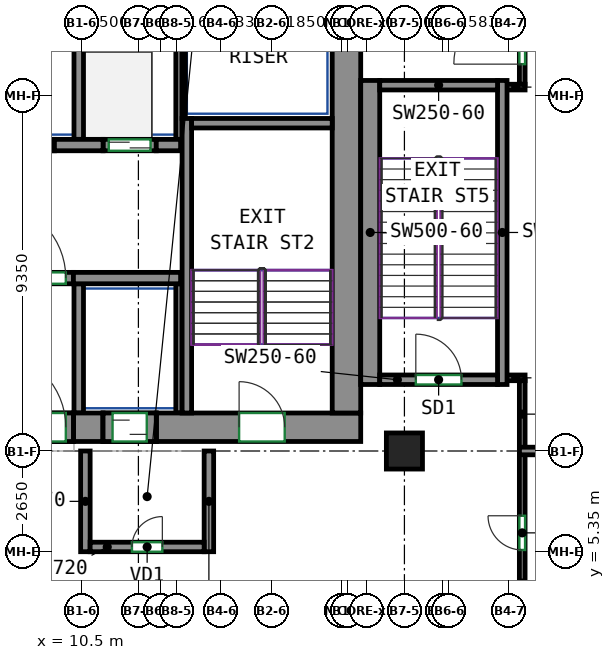
"""IFC4 building model, lengths in metres.
Left out: names, types, materials, properties, quantities, classifications, styles, units other than length and angle.
Written with IfcOpenShell. Run it as: python <this file> out.ifc"""

import sys

from ifc_helpers import new_model, si_unit, direction, frame, frame_2d, origin, origin_2d, place, context, subcontext, project, spatial, rectangle, extrude, source, transform, mapped, element, fill, save


model = new_model("IFC4")
c1 = context("Model", 3, precision=1e-05, world=origin(), true_north=direction((0.0, 1.0)))
c2 = subcontext(c1, "Body", "Model", "MODEL_VIEW")
j1 = project(units=[si_unit("LENGTHUNIT", "METRE"), si_unit("PLANEANGLEUNIT", "RADIAN")], contexts=[c1])
p1 = place(None, origin())
s1 = spatial("IfcSite", under=j1, at=p1, CompositionType="ELEMENT")
p2 = place(p1, origin())
s2 = spatial("IfcBuilding", under=s1, at=p2, CompositionType="ELEMENT")
p3 = place(p2, frame((0.0, 0.0, 233.6)))
s3 = spatial("IfcBuildingStorey", under=s2, at=p3, CompositionType="ELEMENT", Elevation=233.6)
m1 = source(origin(), c2, "Body", "SweptSolid", [
    extrude(rectangle(XDim=0.95, YDim=0.95, at=origin_2d()), origin(), (0.0, 0.0, 1.0), 5.12),
])
p4 = place(p3, frame((19.0, 8.0, 0.0), z_axis=(0.0, 0.0, 1.0), x_axis=(1.0, 0.0, 0.0)))
e1 = element("IfcColumn", 1, at=p4, inside=s3, PredefinedType="COLUMN", context=c2, shape_type="MappedRepresentation", body=[
    mapped(m1, transform((0.0, 0.0, 0.0))),
])
m2 = source(origin(), c2, "Body", "SweptSolid", [
    extrude(rectangle(XDim=0.78, YDim=0.75, at=frame_2d((0.39, 0.0))), origin(), (0.0, 0.0, 1.0), 5.12),
])
p5 = place(p3, frame((10.29, 8.625, 0.0), z_axis=(0.0, 0.0, 1.0), x_axis=(1.0, 0.0, 0.0)))
e2 = element("IfcWall", 2, at=p5, inside=s3, PredefinedType="SHEAR", context=c2, shape_type="MappedRepresentation", body=[
    mapped(m2, transform((0.0, 0.0, 0.0))),
])
m3 = source(origin(), c2, "Body", "SweptSolid", [
    extrude(rectangle(XDim=5.38, YDim=0.75, at=frame_2d((2.69, 0.0))), origin(), (0.0, 0.0, 1.0), 5.12),
])
p6 = place(p3, frame((12.47, 8.625, 0.0), z_axis=(0.0, 0.0, 1.0), x_axis=(1.0, 0.0, 0.0)))
e3 = element("IfcWall", 3, at=p6, inside=s3, PredefinedType="SHEAR", context=c2, shape_type="MappedRepresentation", body=[
    mapped(m3, transform((0.0, 0.0, 0.0))),
])
p7 = place(p6, frame((2.18, 0.0, 0.0)))
e4 = element("IfcOpeningElement", 4, at=p7, cuts=e3, PredefinedType="OPENING", context=c2, shape_type="SweptSolid", body=[
    extrude(rectangle(XDim=1.2, YDim=2.1, at=frame_2d((0.6, 1.05))), frame((0.0, 0.385, 0.0), z_axis=(0.0, -1.0, 0.0), x_axis=(1.0, 0.0, 0.0)), (0.0, 0.0, 1.0), 0.77),
])
m4 = source(origin(), c2, "Body", "SweptSolid", [
    extrude(rectangle(XDim=12.0, YDim=0.75, at=frame_2d((6.0, 0.0))), origin(), (0.0, 0.0, 1.0), 5.12),
])
p8 = place(p3, frame((17.475, 9.0, 0.0), z_axis=(0.0, 0.0, 1.0), x_axis=(0.0, 1.0, 0.0)))
e5 = element("IfcWall", 5, at=p8, inside=s3, PredefinedType="SHEAR", context=c2, shape_type="MappedRepresentation", body=[
    mapped(m4, transform((0.0, 0.0, 0.0))),
])
m5 = source(origin(), c2, "Body", "SweptSolid", [
    extrude(rectangle(XDim=7.75, YDim=0.25, at=frame_2d((3.875, 0.0))), origin(), (0.0, 0.0, 1.0), 5.12),
])
p9 = place(p3, frame((13.275, 9.0, 0.0), z_axis=(0.0, 0.0, 1.0), x_axis=(0.0, 1.0, 0.0)))
e6 = element("IfcWall", 6, at=p9, inside=s3, PredefinedType="SHEAR", context=c2, shape_type="MappedRepresentation", body=[
    mapped(m5, transform((0.0, 0.0, 0.0))),
])
m6 = source(origin(), c2, "Body", "SweptSolid", [
    extrude(rectangle(XDim=3.7, YDim=0.25, at=frame_2d((1.85, 0.0))), origin(), (0.0, 0.0, 1.0), 5.12),
])
p10 = place(p3, frame((13.4, 16.625, 0.0), z_axis=(0.0, 0.0, 1.0), x_axis=(1.0, 0.0, 0.0)))
e7 = element("IfcWall", 7, at=p10, inside=s3, PredefinedType="SHEAR", context=c2, shape_type="MappedRepresentation", body=[
    mapped(m6, transform((0.0, 0.0, 0.0))),
])
m7 = source(origin(), c2, "Body", "SweptSolid", [
    extrude(rectangle(XDim=8.0, YDim=0.5, at=frame_2d((4.0, 0.0))), origin(), (0.0, 0.0, 1.0), 5.12),
])
p11 = place(p3, frame((18.1, 9.75, 0.0), z_axis=(0.0, 0.0, 1.0), x_axis=(0.0, 1.0, 0.0)))
e8 = element("IfcWall", 8, at=p11, inside=s3, PredefinedType="SHEAR", context=c2, shape_type="MappedRepresentation", body=[
    mapped(m7, transform((0.0, 0.0, 0.0))),
])
m8 = source(origin(), c2, "Body", "SweptSolid", [
    extrude(rectangle(XDim=8.0, YDim=0.25, at=frame_2d((4.0, 0.0))), origin(), (0.0, 0.0, 1.0), 5.12),
])
p12 = place(p3, frame((21.575, 9.75, 0.0), z_axis=(0.0, 0.0, 1.0), x_axis=(0.0, 1.0, 0.0)))
e9 = element("IfcWall", 9, at=p12, inside=s3, PredefinedType="SHEAR", context=c2, shape_type="MappedRepresentation", body=[
    mapped(m8, transform((0.0, 0.0, 0.0))),
])
m9 = source(origin(), c2, "Body", "SweptSolid", [
    extrude(rectangle(XDim=3.1, YDim=0.25, at=frame_2d((1.55, 0.0))), origin(), (0.0, 0.0, 1.0), 5.12),
])
p13 = place(p3, frame((18.35, 9.875, 0.0), z_axis=(0.0, 0.0, 1.0), x_axis=(1.0, 0.0, 0.0)))
e10 = element("IfcWall", 10, at=p13, inside=s3, PredefinedType="SHEAR", context=c2, shape_type="MappedRepresentation", body=[
    mapped(m9, transform((0.0, 0.0, 0.0))),
])
p14 = place(p13, frame((0.95, 0.0, 0.0)))
e11 = element("IfcOpeningElement", 11, at=p14, cuts=e10, PredefinedType="OPENING", context=c2, shape_type="SweptSolid", body=[
    extrude(rectangle(XDim=1.2, YDim=2.1, at=frame_2d((0.6, 1.05))), frame((0.0, 0.135, 0.0), z_axis=(0.0, -1.0, 0.0), x_axis=(1.0, 0.0, 0.0)), (0.0, 0.0, 1.0), 0.27),
])
p15 = place(p3, frame((18.35, 17.625, 0.0), z_axis=(0.0, 0.0, 1.0), x_axis=(1.0, 0.0, 0.0)))
e12 = element("IfcWall", 12, at=p15, inside=s3, PredefinedType="SHEAR", context=c2, shape_type="MappedRepresentation", body=[
    mapped(m9, transform((0.0, 0.0, 0.0))),
])
m10 = source(origin(), c2, "Body", "SweptSolid", [
    extrude(rectangle(XDim=2.82, YDim=0.3, at=frame_2d((1.41, 0.0))), origin(), (0.0, 0.0, 1.0), 5.12),
])
p16 = place(p3, frame((10.29, 12.55, 0.0), z_axis=(0.0, 0.0, 1.0), x_axis=(1.0, 0.0, 0.0)))
e13 = element("IfcWall", 13, at=p16, inside=s3, PredefinedType="SHEAR", context=c2, shape_type="MappedRepresentation", body=[
    mapped(m10, transform((0.0, 0.0, 0.0))),
])
m11 = source(origin(), c2, "Body", "SweptSolid", [
    extrude(rectangle(XDim=1.28, YDim=0.3, at=frame_2d((0.64, 0.0))), origin(), (0.0, 0.0, 1.0), 5.12),
])
p17 = place(p3, frame((9.79, 16.05, 0.0), z_axis=(0.0, 0.0, 1.0), x_axis=(1.0, 0.0, 0.0)))
e14 = element("IfcWall", 14, at=p17, inside=s3, PredefinedType="SHEAR", context=c2, shape_type="MappedRepresentation", body=[
    mapped(m11, transform((0.0, 0.0, 0.0))),
])
m12 = source(origin(), c2, "Body", "SweptSolid", [
    extrude(rectangle(XDim=0.64, YDim=0.3, at=frame_2d((0.32, 0.0))), origin(), (0.0, 0.0, 1.0), 5.12),
])
p18 = place(p3, frame((12.47, 16.05, 0.0), z_axis=(0.0, 0.0, 1.0), x_axis=(1.0, 0.0, 0.0)))
e15 = element("IfcWall", 15, at=p18, inside=s3, PredefinedType="SHEAR", context=c2, shape_type="MappedRepresentation", body=[
    mapped(m12, transform((0.0, 0.0, 0.0))),
])
m13 = source(origin(), c2, "Body", "SweptSolid", [
    extrude(rectangle(XDim=2.4, YDim=0.75, at=frame_2d((1.2, 0.0))), origin(), (0.0, 0.0, 1.0), 0.92),
])
p19 = place(p3, frame((7.89, 8.625, 4.2), z_axis=(0.0, 0.0, 1.0), x_axis=(1.0, 0.0, 0.0)))
e16 = element("IfcWall", 16, at=p19, inside=s3, PredefinedType="SHEAR", context=c2, shape_type="MappedRepresentation", body=[
    mapped(m13, transform((0.0, 0.0, 0.0))),
])
m14 = source(origin(), c2, "Body", "SweptSolid", [
    extrude(rectangle(XDim=1.4, YDim=0.75, at=frame_2d((0.7, 0.0))), origin(), (0.0, 0.0, 1.0), 1.17),
])
p20 = place(p3, frame((11.07, 8.625, 3.95), z_axis=(0.0, 0.0, 1.0), x_axis=(1.0, 0.0, 0.0)))
e17 = element("IfcWall", 17, at=p20, inside=s3, PredefinedType="SHEAR", context=c2, shape_type="MappedRepresentation", body=[
    mapped(m14, transform((0.0, 0.0, 0.0))),
])
m15 = source(origin(), c2, "Body", "SweptSolid", [
    extrude(rectangle(XDim=1.4, YDim=0.3, at=frame_2d((0.7, 0.0))), origin(), (0.0, 0.0, 1.0), 5.12),
])
p21 = place(p3, frame((11.07, 16.05, 0.0), z_axis=(0.0, 0.0, 1.0), x_axis=(1.0, 0.0, 0.0)))
e18 = element("IfcWall", 18, at=p21, inside=s3, PredefinedType="PARTITIONING", context=c2, shape_type="MappedRepresentation", body=[
    mapped(m15, transform((0.0, 0.0, 0.0))),
])
p22 = place(p21, frame((0.15, 0.0, 0.0)))
e19 = element("IfcOpeningElement", 19, at=p22, cuts=e18, PredefinedType="OPENING", context=c2, shape_type="SweptSolid", body=[
    extrude(rectangle(XDim=1.1, YDim=2.1, at=frame_2d((0.55, 1.05))), frame((0.0, 0.16, 0.0), z_axis=(0.0, -1.0, 0.0), x_axis=(1.0, 0.0, 0.0)), (0.0, 0.0, 1.0), 0.32),
])
m16 = source(origin(), c2, "Body", "SweptSolid", [
    extrude(rectangle(XDim=2.4, YDim=0.3, at=frame_2d((1.2, 0.0))), origin(), (0.0, 0.0, 1.0), 5.12),
])
p23 = place(p3, frame((7.89, 12.55, 0.0), z_axis=(0.0, 0.0, 1.0), x_axis=(1.0, 0.0, 0.0)))
e20 = element("IfcWall", 20, at=p23, inside=s3, PredefinedType="PARTITIONING", context=c2, shape_type="MappedRepresentation", body=[
    mapped(m16, transform((0.0, 0.0, 0.0))),
])
p24 = place(p23, frame((0.2, 0.0, 0.0)))
e21 = element("IfcOpeningElement", 21, at=p24, cuts=e20, PredefinedType="OPENING", context=c2, shape_type="SweptSolid", body=[
    extrude(rectangle(XDim=2.0, YDim=2.1, at=frame_2d((1.0, 1.05))), frame((0.0, 0.16, 0.0), z_axis=(0.0, -1.0, 0.0), x_axis=(1.0, 0.0, 0.0)), (0.0, 0.0, 1.0), 0.32),
])
m17 = source(origin(), c2, "Body", "SweptSolid", [
    extrude(rectangle(XDim=1.4, YDim=0.3, at=frame_2d((0.7, 0.0))), origin(), (0.0, 0.0, 1.0), 5.12),
])
p25 = place(p3, frame((8.39, 16.05, 0.0), z_axis=(0.0, 0.0, 1.0), x_axis=(1.0, 0.0, 0.0)))
e22 = element("IfcWall", 22, at=p25, inside=s3, PredefinedType="PARTITIONING", context=c2, shape_type="MappedRepresentation", body=[
    mapped(m17, transform((0.0, 0.0, 0.0))),
])
p26 = place(p25, frame((0.15, 0.0, 0.0)))
e23 = element("IfcOpeningElement", 23, at=p26, cuts=e22, PredefinedType="OPENING", context=c2, shape_type="SweptSolid", body=[
    extrude(rectangle(XDim=1.1, YDim=2.1, at=frame_2d((0.55, 1.05))), frame((0.0, 0.16, 0.0), z_axis=(0.0, -1.0, 0.0), x_axis=(1.0, 0.0, 0.0)), (0.0, 0.0, 1.0), 0.32),
])
m18 = source(origin(), c2, "Body", "SweptSolid", [
    extrude(rectangle(XDim=2.65, YDim=0.25, at=frame_2d((1.325, 0.0))), origin(), (0.0, 0.0, 1.0), 4.57),
])
for number, where, z_axis, x_axis in (
    (24, (10.605, 5.35, 0.0), (0.0, 0.0, 1.0), (0.0, 1.0, 0.0)),
    (25, (13.855, 5.35, 0.0), (0.0, 0.0, 1.0), (0.0, 1.0, 0.0)),
):
    element("IfcWall", number, at=place(p3, frame(where, z_axis=z_axis, x_axis=x_axis)), inside=s3, PredefinedType="PARTITIONING", context=c2, shape_type="MappedRepresentation", body=[
        mapped(m18, transform((0.0, 0.0, 0.0))),
    ])
m19 = source(origin(), c2, "Body", "SweptSolid", [
    extrude(rectangle(XDim=3.0, YDim=0.25, at=frame_2d((1.5, 0.0))), origin(), (0.0, 0.0, 1.0), 5.12),
])
p27 = place(p3, frame((10.73, 5.475, 0.0), z_axis=(0.0, 0.0, 1.0), x_axis=(1.0, 0.0, 0.0)))
e26 = element("IfcWall", 26, at=p27, inside=s3, PredefinedType="PARTITIONING", context=c2, shape_type="MappedRepresentation", body=[
    mapped(m19, transform((0.0, 0.0, 0.0))),
])
p28 = place(p27, frame((1.1, 0.0, 0.0)))
e27 = element("IfcOpeningElement", 27, at=p28, cuts=e26, PredefinedType="OPENING", context=c2, shape_type="SweptSolid", body=[
    extrude(rectangle(XDim=0.8, YDim=2.0, at=frame_2d((0.4, 1.0))), frame((0.0, 0.135, 0.0), z_axis=(0.0, -1.0, 0.0), x_axis=(1.0, 0.0, 0.0)), (0.0, 0.0, 1.0), 0.27),
])
m20 = source(origin(), c2, "Body", "SweptSolid", [
    extrude(rectangle(XDim=3.275, YDim=0.165, at=frame_2d((1.638, 0.0))), origin(), (0.0, 0.0, 1.0), 5.12),
])
p29 = place(p3, frame((13.067, 16.2, 0.0), z_axis=(0.0, 0.0, 1.0), x_axis=(0.0, 1.0, 0.0)))
e28 = element("IfcWall", 28, at=p29, inside=s3, PredefinedType="PARTITIONING", context=c2, shape_type="MappedRepresentation", body=[
    mapped(m20, transform((0.0, 0.0, 0.0))),
])
m21 = source(origin(), c2, "Body", "SweptSolid", [
    extrude(rectangle(XDim=3.275, YDim=0.25, at=frame_2d((1.638, 0.0))), origin(), (0.0, 0.0, 1.0), 5.12),
])
p30 = place(p3, frame((10.43, 16.2, 0.0), z_axis=(0.0, 0.0, 1.0), x_axis=(0.0, 1.0, 0.0)))
e29 = element("IfcWall", 29, at=p30, inside=s3, PredefinedType="PARTITIONING", context=c2, shape_type="MappedRepresentation", body=[
    mapped(m21, transform((0.0, 0.0, 0.0))),
])
m22 = source(origin(), c2, "Body", "SweptSolid", [
    extrude(rectangle(XDim=2.725, YDim=0.085, at=frame_2d((1.363, 0.0))), origin(), (0.0, 0.0, 1.0), 5.12),
])
p31 = place(p3, frame((13.192, 16.75, 0.0), z_axis=(0.0, 0.0, 1.0), x_axis=(0.0, 1.0, 0.0)))
e30 = element("IfcWall", 30, at=p31, inside=s3, PredefinedType="PARTITIONING", context=c2, shape_type="MappedRepresentation", body=[
    mapped(m22, transform((0.0, 0.0, 0.0))),
])
m23 = source(origin(), c2, "Body", "SweptSolid", [
    extrude(rectangle(XDim=3.4, YDim=0.25, at=frame_2d((1.7, 0.0))), origin(), (0.0, 0.0, 1.0), 5.12),
])
p32 = place(p3, frame((10.43, 9.0, 0.0), z_axis=(0.0, 0.0, 1.0), x_axis=(0.0, 1.0, 0.0)))
e31 = element("IfcWall", 31, at=p32, inside=s3, PredefinedType="PARTITIONING", context=c2, shape_type="MappedRepresentation", body=[
    mapped(m23, transform((0.0, 0.0, 0.0))),
])
m24 = source(origin(), c2, "Body", "SweptSolid", [
    extrude(rectangle(XDim=3.4, YDim=0.165, at=frame_2d((1.7, 0.0))), origin(), (0.0, 0.0, 1.0), 5.12),
])
p33 = place(p3, frame((13.067, 9.0, 0.0), z_axis=(0.0, 0.0, 1.0), x_axis=(0.0, 1.0, 0.0)))
e32 = element("IfcWall", 32, at=p33, inside=s3, PredefinedType="PARTITIONING", context=c2, shape_type="MappedRepresentation", body=[
    mapped(m24, transform((0.0, 0.0, 0.0))),
])
m25 = source(origin(), c2, "Body", "SweptSolid", [
    extrude(rectangle(XDim=2.4, YDim=0.75, at=frame_2d((1.2, 0.0))), origin(), (0.0, 0.0, 1.0), 2.7),
])
p34 = place(p3, frame((7.89, 8.625, 0.0), z_axis=(0.0, 0.0, 1.0), x_axis=(1.0, 0.0, 0.0)))
e33 = element("IfcWall", 33, at=p34, inside=s3, PredefinedType="PARTITIONING", context=c2, shape_type="MappedRepresentation", body=[
    mapped(m25, transform((0.0, 0.0, 0.0))),
])
p35 = place(p34, frame((0.2, 0.0, 0.0)))
e34 = element("IfcOpeningElement", 34, at=p35, cuts=e33, PredefinedType="OPENING", context=c2, shape_type="SweptSolid", body=[
    extrude(rectangle(XDim=2.0, YDim=2.1, at=frame_2d((1.0, 1.05))), frame((0.0, 0.385, 0.0), z_axis=(0.0, -1.0, 0.0), x_axis=(1.0, 0.0, 0.0)), (0.0, 0.0, 1.0), 0.77),
])
m26 = source(origin(), c2, "Body", "SweptSolid", [
    extrude(rectangle(XDim=1.4, YDim=0.75, at=frame_2d((0.7, 0.0))), origin(), (0.0, 0.0, 1.0), 2.7),
])
p36 = place(p3, frame((11.07, 8.625, 0.0), z_axis=(0.0, 0.0, 1.0), x_axis=(1.0, 0.0, 0.0)))
e35 = element("IfcWall", 35, at=p36, inside=s3, PredefinedType="PARTITIONING", context=c2, shape_type="MappedRepresentation", body=[
    mapped(m26, transform((0.0, 0.0, 0.0))),
])
p37 = place(p36, frame((0.25, 0.0, 0.0)))
e36 = element("IfcOpeningElement", 36, at=p37, cuts=e35, PredefinedType="OPENING", context=c2, shape_type="SweptSolid", body=[
    extrude(rectangle(XDim=0.9, YDim=2.1, at=frame_2d((0.45, 1.05))), frame((0.0, 0.385, 0.0), z_axis=(0.0, -1.0, 0.0), x_axis=(1.0, 0.0, 0.0)), (0.0, 0.0, 1.0), 0.77),
])
p38 = place(p3, frame((22.1, 3.075, 0.0), z_axis=(0.0, 0.0, 1.0), x_axis=(0.0, 1.0, 0.0)))
e37 = element("IfcWall", 37, at=p38, inside=s3, PredefinedType="PARTITIONING", context=c2, shape_type="SweptSolid", body=[
    extrude(rectangle(XDim=4.835, YDim=0.15, at=frame_2d((2.417, 0.0))), origin(), (0.0, 0.0, 1.0), 5.12),
])
p39 = place(p38, frame((2.321, 0.0, 0.0)))
e38 = element("IfcOpeningElement", 38, at=p39, cuts=e37, PredefinedType="OPENING", context=c2, shape_type="SweptSolid", body=[
    extrude(rectangle(XDim=0.9, YDim=2.1, at=frame_2d((0.45, 1.05))), frame((0.0, 0.085, 0.0), z_axis=(0.0, -1.0, 0.0), x_axis=(1.0, 0.0, 0.0)), (0.0, 0.0, 1.0), 0.17),
])
p40 = place(p3, frame((22.1, 17.65, 0.0), z_axis=(0.0, 0.0, 1.0), x_axis=(0.0, 1.0, 0.0)))
e39 = element("IfcWall", 39, at=p40, inside=s3, PredefinedType="PARTITIONING", context=c2, shape_type="SweptSolid", body=[
    extrude(rectangle(XDim=7.275, YDim=0.15, at=frame_2d((3.638, 0.0))), origin(), (0.0, 0.0, 1.0), 5.12),
])
p41 = place(p40, frame((0.529, 0.0, 0.0)))
e40 = element("IfcOpeningElement", 40, at=p41, cuts=e39, PredefinedType="OPENING", context=c2, shape_type="SweptSolid", body=[
    extrude(rectangle(XDim=1.8, YDim=2.1, at=frame_2d((0.9, 1.05))), frame((0.0, 0.085, 0.0), z_axis=(0.0, -1.0, 0.0), x_axis=(1.0, 0.0, 0.0)), (0.0, 0.0, 1.0), 0.17),
])
for number, where, z_axis, x_axis in (
    (41, (21.68, 17.575, 0.0), (0.0, 0.0, 1.0), (1.0, 0.0, 0.0)),
    (42, (22.175, 9.925, 0.0), (0.0, 0.0, 1.0), (-1.0, 0.0, 0.0)),
):
    element("IfcWall", number, at=place(p3, frame(where, z_axis=z_axis, x_axis=x_axis)), inside=s3, PredefinedType="PARTITIONING", context=c2, shape_type="SweptSolid", body=[
        extrude(rectangle(XDim=0.495, YDim=0.15, at=frame_2d((0.248, 0.0))), origin(), (0.0, 0.0, 1.0), 5.12),
    ])
p42 = place(p3, frame((22.1, 8.09, 0.0), z_axis=(0.0, 0.0, 1.0), x_axis=(0.0, 1.0, 0.0)))
e43 = element("IfcWall", 43, at=p42, inside=s3, PredefinedType="PARTITIONING", context=c2, shape_type="SweptSolid", body=[
    extrude(rectangle(XDim=1.76, YDim=0.15, at=frame_2d((0.88, 0.0))), origin(), (0.0, 0.0, 1.0), 5.12),
])
p43 = place(p3, frame((28.7, 8.0, 0.0), z_axis=(0.0, 0.0, 1.0), x_axis=(-1.0, 0.0, 0.0)))
e44 = element("IfcWall", 44, at=p43, inside=s3, PredefinedType="PARTITIONING", context=c2, shape_type="SweptSolid", body=[
    extrude(rectangle(XDim=6.673, YDim=0.2, at=frame_2d((3.336, 0.0))), origin(), (0.0, 0.0, 1.0), 4.57),
])
p44 = place(p24, origin())
e45 = element("IfcDoor", 45, at=p44, inside=s3, OperationType="DOUBLE_DOOR_SINGLE_SWING", PredefinedType="DOOR", context=c2, shape_type="SweptSolid", body=[
    extrude(rectangle(XDim=2.0, YDim=2.1, at=frame_2d((1.0, 1.05))), frame((0.0, 0.025, 0.0), z_axis=(0.0, -1.0, 0.0), x_axis=(1.0, 0.0, 0.0)), (0.0, 0.0, 1.0), 0.05),
])
fill(e21, e45)
p45 = place(p35, origin())
e46 = element("IfcDoor", 46, at=p45, inside=s3, OperationType="DOUBLE_DOOR_SINGLE_SWING", PredefinedType="DOOR", context=c2, shape_type="SweptSolid", body=[
    extrude(rectangle(XDim=2.0, YDim=2.1, at=frame_2d((1.0, 1.05))), frame((0.0, 0.28, 0.0), z_axis=(0.0, -1.0, 0.0), x_axis=(1.0, 0.0, 0.0)), (0.0, 0.0, 1.0), 0.05),
])
fill(e34, e46)
p46 = place(p28, origin())
e47 = element("IfcDoor", 47, at=p46, inside=s3, OperationType="SINGLE_SWING_RIGHT", PredefinedType="DOOR", context=c2, shape_type="SweptSolid", body=[
    extrude(rectangle(XDim=0.8, YDim=2.0, at=frame_2d((0.4, 1.0))), frame((0.0, 0.025, 0.0), z_axis=(0.0, -1.0, 0.0), x_axis=(1.0, 0.0, 0.0)), (0.0, 0.0, 1.0), 0.05),
])
fill(e27, e47)
p47 = place(p37, origin())
e48 = element("IfcDoor", 48, at=p47, inside=s3, OperationType="SLIDING_TO_LEFT", PredefinedType="DOOR", context=c2, shape_type="SweptSolid", body=[
    extrude(rectangle(XDim=0.9, YDim=2.1, at=frame_2d((0.45, 1.05))), frame((0.0, 0.28, 0.0), z_axis=(0.0, -1.0, 0.0), x_axis=(1.0, 0.0, 0.0)), (0.0, 0.0, 1.0), 0.05),
])
fill(e36, e48)
p48 = place(p22, origin())
e49 = element("IfcDoor", 49, at=p48, inside=s3, OperationType="DOUBLE_DOOR_SLIDING", PredefinedType="DOOR", context=c2, shape_type="SweptSolid", body=[
    extrude(rectangle(XDim=1.1, YDim=2.1, at=frame_2d((0.55, 1.05))), frame((0.0, 0.025, 0.0), z_axis=(0.0, -1.0, 0.0), x_axis=(1.0, 0.0, 0.0)), (0.0, 0.0, 1.0), 0.05),
])
fill(e19, e49)
p49 = place(p7, origin())
e50 = element("IfcDoor", 50, at=p49, inside=s3, OperationType="DOUBLE_DOOR_SINGLE_SWING", PredefinedType="DOOR", context=c2, shape_type="SweptSolid", body=[
    extrude(rectangle(XDim=1.2, YDim=2.1, at=frame_2d((0.6, 1.05))), frame((0.0, 0.28, 0.0), z_axis=(0.0, -1.0, 0.0), x_axis=(1.0, 0.0, 0.0)), (0.0, 0.0, 1.0), 0.05),
])
fill(e4, e50)
p50 = place(p14, origin())
e51 = element("IfcDoor", 51, at=p50, inside=s3, OperationType="DOUBLE_DOOR_SINGLE_SWING", PredefinedType="DOOR", context=c2, shape_type="SweptSolid", body=[
    extrude(rectangle(XDim=1.2, YDim=2.1, at=frame_2d((0.6, 1.05))), frame((0.0, 0.025, 0.0), z_axis=(0.0, -1.0, 0.0), x_axis=(1.0, 0.0, 0.0)), (0.0, 0.0, 1.0), 0.05),
])
fill(e11, e51)
p51 = place(p39, origin())
e52 = element("IfcDoor", 52, at=p51, inside=s3, OperationType="SINGLE_SWING_RIGHT", PredefinedType="DOOR", context=c2, shape_type="SweptSolid", body=[
    extrude(rectangle(XDim=0.9, YDim=2.1, at=frame_2d((0.45, 1.05))), frame((0.0, 0.025, 0.0), z_axis=(0.0, -1.0, 0.0), x_axis=(1.0, 0.0, 0.0)), (0.0, 0.0, 1.0), 0.05),
])
fill(e38, e52)
p52 = place(p41, origin())
e53 = element("IfcDoor", 53, at=p52, inside=s3, OperationType="DOUBLE_DOOR_SINGLE_SWING", PredefinedType="DOOR", context=c2, shape_type="SweptSolid", body=[
    extrude(rectangle(XDim=1.8, YDim=2.1, at=frame_2d((0.9, 1.05))), frame((0.0, 0.025, 0.0), z_axis=(0.0, -1.0, 0.0), x_axis=(1.0, 0.0, 0.0)), (0.0, 0.0, 1.0), 0.05),
])
fill(e40, e53)
save(model, sys.argv[1])
